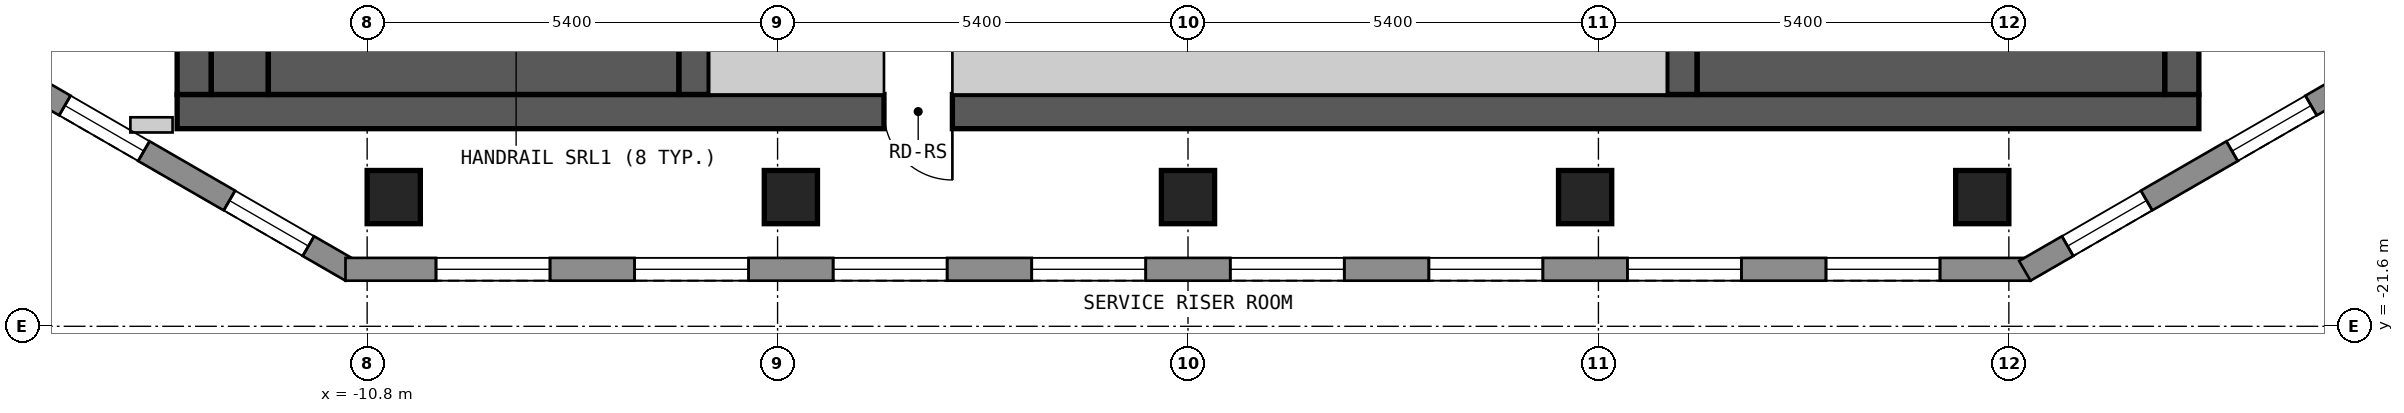
"""IFC4 building model, lengths in metres.
Left out: names, types, materials, properties, quantities, classifications, styles, units other than length and angle.
Written with IfcOpenShell. Run it as: python <this file> out.ifc"""

import sys

from ifc_helpers import new_model, si_unit, direction, frame, frame_2d, origin, origin_2d, place, context, subcontext, project, spatial, polyline, rectangle, outline, extrude, element, fill, save


model = new_model("IFC4")
c1 = context("Model", 3, precision=1e-05, world=origin(), true_north=direction((0.0, 1.0)))
c2 = subcontext(c1, "Body", "Model", "MODEL_VIEW")
j1 = project(units=[si_unit("LENGTHUNIT", "METRE"), si_unit("PLANEANGLEUNIT", "RADIAN")], contexts=[c1])
p1 = place(None, origin())
s1 = spatial("IfcSite", under=j1, at=p1, CompositionType="ELEMENT")
p2 = place(p1, origin())
s2 = spatial("IfcBuilding", under=s1, at=p2, CompositionType="ELEMENT")
p3 = place(p2, frame((0.0, 0.0, 220.8)))
s3 = spatial("IfcBuildingStorey", under=s2, at=p3, CompositionType="ELEMENT", Elevation=220.8)
for number, where, z_axis, x_axis in (
    (1, (-10.45, -19.9, 0.0), (0.0, 0.0, 1.0), (1.0, 0.0, 0.0)),
    (2, (-5.225, -19.9, 0.0), (0.0, 0.0, 1.0), (1.0, 0.0, 0.0)),
    (3, (0.0, -19.9, 0.0), (0.0, 0.0, 1.0), (1.0, 0.0, 0.0)),
    (4, (5.225, -19.9, 0.0), (0.0, 0.0, 1.0), (1.0, 0.0, 0.0)),
    (5, (10.45, -19.9, 0.0), (0.0, 0.0, 1.0), (1.0, 0.0, 0.0)),
):
    element("IfcColumn", number, at=place(p3, frame(where, z_axis=z_axis, x_axis=x_axis)), inside=s3, PredefinedType="COLUMN", context=c2, shape_type="SweptSolid", body=[
        extrude(rectangle(XDim=0.7, YDim=0.7, at=origin_2d()), origin(), (0.0, 0.0, 1.0), 3.0),
    ])
p4 = place(p3, frame((-13.3, -18.775, 0.0), z_axis=(0.0, 0.0, 1.0), x_axis=(1.0, 0.0, 0.0)))
e6 = element("IfcWall", 6, at=p4, inside=s3, PredefinedType="SHEAR", context=c2, shape_type="SweptSolid", body=[
    extrude(rectangle(XDim=26.6, YDim=0.45, at=frame_2d((13.3, 0.0))), origin(), (0.0, 0.0, 1.0), 2.7),
])
p5 = place(p4, frame((9.3, 0.0, 0.0)))
e7 = element("IfcOpeningElement", 7, at=p5, cuts=e6, PredefinedType="OPENING", context=c2, shape_type="SweptSolid", body=[
    extrude(rectangle(XDim=0.9, YDim=2.1, at=frame_2d((0.45, 1.05))), frame((0.0, 0.235, 0.0), z_axis=(0.0, -1.0, 0.0), x_axis=(1.0, 0.0, 0.0)), (0.0, 0.0, 1.0), 0.47),
])
p6 = place(p3, frame((-13.075, -18.55, 0.0), z_axis=(0.0, 0.0, 1.0), x_axis=(0.0, 1.0, 0.0)))
e8 = element("IfcWall", 8, at=p6, inside=s3, PredefinedType="SHEAR", context=c2, shape_type="SweptSolid", body=[
    extrude(rectangle(XDim=13.1, YDim=0.45, at=frame_2d((6.55, 0.0))), origin(), (0.0, 0.0, 1.0), 2.7),
])
p7 = place(p6, frame((4.35, 0.0, 0.0)))
e9 = element("IfcOpeningElement", 9, at=p7, cuts=e8, PredefinedType="OPENING", context=c2, shape_type="SweptSolid", body=[
    extrude(rectangle(XDim=1.2, YDim=2.1, at=frame_2d((0.6, 1.05))), frame((0.0, 0.235, 0.0), z_axis=(0.0, -1.0, 0.0), x_axis=(1.0, 0.0, 0.0)), (0.0, 0.0, 1.0), 0.47),
])
p8 = place(p3, frame((13.075, -18.55, 0.0), z_axis=(0.0, 0.0, 1.0), x_axis=(0.0, 1.0, 0.0)))
e10 = element("IfcWall", 10, at=p8, inside=s3, PredefinedType="SHEAR", context=c2, shape_type="SweptSolid", body=[
    extrude(rectangle(XDim=13.1, YDim=0.45, at=frame_2d((6.55, 0.0))), origin(), (0.0, 0.0, 1.0), 2.7),
])
for number, where, z_axis, x_axis in (
    (11, (-6.5, -18.55, 0.0), (0.0, 0.0, 1.0), (0.0, 1.0, 0.0)),
    (12, (6.5, -18.55, 0.0), (0.0, 0.0, 1.0), (0.0, 1.0, 0.0)),
):
    element("IfcWall", number, at=place(p3, frame(where, z_axis=z_axis, x_axis=x_axis)), inside=s3, PredefinedType="SHEAR", context=c2, shape_type="SweptSolid", body=[
        extrude(rectangle(XDim=3.7, YDim=0.4, at=frame_2d((1.85, 0.0))), origin(), (0.0, 0.0, 1.0), 2.7),
    ])
p9 = place(p3, frame((-15.34, -18.37, 0.0), z_axis=(0.0, 0.0, 1.0), x_axis=(0.866022959057, -0.500004234368, 0.0)))
e13 = element("IfcWall", 13, at=p9, inside=s3, PredefinedType="SOLIDWALL", context=c2, shape_type="SweptSolid", body=[
    extrude(outline(polyline([(0.0, -0.15), (5.0, -0.15), (4.92, 0.15), (0.08, 0.15), (0.0, -0.15)])), origin(), (0.0, 0.0, 1.0), 2.7),
])
p10 = place(p9, frame((0.65, 0.0, 0.15)))
e14 = element("IfcOpeningElement", 14, at=p10, cuts=e13, PredefinedType="OPENING", context=c2, shape_type="SweptSolid", body=[
    extrude(rectangle(XDim=1.2, YDim=2.1, at=frame_2d((0.6, 1.05))), frame((0.0, 0.16, 0.0), z_axis=(0.0, -1.0, 0.0), x_axis=(1.0, 0.0, 0.0)), (0.0, 0.0, 1.0), 0.32),
])
p11 = place(p9, frame((3.15, 0.0, 0.15)))
e15 = element("IfcOpeningElement", 15, at=p11, cuts=e13, PredefinedType="OPENING", context=c2, shape_type="SweptSolid", body=[
    extrude(rectangle(XDim=1.2, YDim=2.1, at=frame_2d((0.6, 1.05))), frame((0.0, 0.16, 0.0), z_axis=(0.0, -1.0, 0.0), x_axis=(1.0, 0.0, 0.0)), (0.0, 0.0, 1.0), 0.32),
])
p12 = place(p3, frame((-11.085, -20.85, 0.0), z_axis=(0.0, 0.0, 1.0), x_axis=(1.0, 0.0, 0.0)))
e16 = element("IfcWall", 16, at=p12, inside=s3, PredefinedType="SOLIDWALL", context=c2, shape_type="SweptSolid", body=[
    extrude(outline(polyline([(0.0, -0.15), (22.17, -0.15), (22.09, 0.15), (0.08, 0.15), (0.0, -0.15)])), origin(), (0.0, 0.0, 1.0), 2.7),
])
p13 = place(p12, frame((1.191, 0.0, 0.15)))
e17 = element("IfcOpeningElement", 17, at=p13, cuts=e16, PredefinedType="OPENING", context=c2, shape_type="SweptSolid", body=[
    extrude(rectangle(XDim=1.5, YDim=2.1, at=frame_2d((0.75, 1.05))), frame((0.0, 0.16, 0.0), z_axis=(0.0, -1.0, 0.0), x_axis=(1.0, 0.0, 0.0)), (0.0, 0.0, 1.0), 0.32),
])
p14 = place(p12, frame((3.804, 0.0, 0.15)))
e18 = element("IfcOpeningElement", 18, at=p14, cuts=e16, PredefinedType="OPENING", context=c2, shape_type="SweptSolid", body=[
    extrude(rectangle(XDim=1.5, YDim=2.1, at=frame_2d((0.75, 1.05))), frame((0.0, 0.16, 0.0), z_axis=(0.0, -1.0, 0.0), x_axis=(1.0, 0.0, 0.0)), (0.0, 0.0, 1.0), 0.32),
])
p15 = place(p12, frame((6.416, 0.0, 0.15)))
e19 = element("IfcOpeningElement", 19, at=p15, cuts=e16, PredefinedType="OPENING", context=c2, shape_type="SweptSolid", body=[
    extrude(rectangle(XDim=1.5, YDim=2.1, at=frame_2d((0.75, 1.05))), frame((0.0, 0.16, 0.0), z_axis=(0.0, -1.0, 0.0), x_axis=(1.0, 0.0, 0.0)), (0.0, 0.0, 1.0), 0.32),
])
p16 = place(p12, frame((9.029, 0.0, 0.15)))
e20 = element("IfcOpeningElement", 20, at=p16, cuts=e16, PredefinedType="OPENING", context=c2, shape_type="SweptSolid", body=[
    extrude(rectangle(XDim=1.5, YDim=2.1, at=frame_2d((0.75, 1.05))), frame((0.0, 0.16, 0.0), z_axis=(0.0, -1.0, 0.0), x_axis=(1.0, 0.0, 0.0)), (0.0, 0.0, 1.0), 0.32),
])
p17 = place(p12, frame((11.641, 0.0, 0.15)))
e21 = element("IfcOpeningElement", 21, at=p17, cuts=e16, PredefinedType="OPENING", context=c2, shape_type="SweptSolid", body=[
    extrude(rectangle(XDim=1.5, YDim=2.1, at=frame_2d((0.75, 1.05))), frame((0.0, 0.16, 0.0), z_axis=(0.0, -1.0, 0.0), x_axis=(1.0, 0.0, 0.0)), (0.0, 0.0, 1.0), 0.32),
])
p18 = place(p12, frame((14.254, 0.0, 0.15)))
e22 = element("IfcOpeningElement", 22, at=p18, cuts=e16, PredefinedType="OPENING", context=c2, shape_type="SweptSolid", body=[
    extrude(rectangle(XDim=1.5, YDim=2.1, at=frame_2d((0.75, 1.05))), frame((0.0, 0.16, 0.0), z_axis=(0.0, -1.0, 0.0), x_axis=(1.0, 0.0, 0.0)), (0.0, 0.0, 1.0), 0.32),
])
p19 = place(p12, frame((16.866, 0.0, 0.15)))
e23 = element("IfcOpeningElement", 23, at=p19, cuts=e16, PredefinedType="OPENING", context=c2, shape_type="SweptSolid", body=[
    extrude(rectangle(XDim=1.5, YDim=2.1, at=frame_2d((0.75, 1.05))), frame((0.0, 0.16, 0.0), z_axis=(0.0, -1.0, 0.0), x_axis=(1.0, 0.0, 0.0)), (0.0, 0.0, 1.0), 0.32),
])
p20 = place(p12, frame((19.479, 0.0, 0.15)))
e24 = element("IfcOpeningElement", 24, at=p20, cuts=e16, PredefinedType="OPENING", context=c2, shape_type="SweptSolid", body=[
    extrude(rectangle(XDim=1.5, YDim=2.1, at=frame_2d((0.75, 1.05))), frame((0.0, 0.16, 0.0), z_axis=(0.0, -1.0, 0.0), x_axis=(1.0, 0.0, 0.0)), (0.0, 0.0, 1.0), 0.32),
])
p21 = place(p3, frame((11.01, -20.87, 0.0), z_axis=(0.0, 0.0, 1.0), x_axis=(0.866022959057, 0.500004234368, 0.0)))
e25 = element("IfcWall", 25, at=p21, inside=s3, PredefinedType="SOLIDWALL", context=c2, shape_type="SweptSolid", body=[
    extrude(outline(polyline([(0.0, -0.15), (5.0, -0.15), (4.92, 0.15), (0.08, 0.15), (0.0, -0.15)])), origin(), (0.0, 0.0, 1.0), 2.7),
])
p22 = place(p21, frame((0.65, 0.0, 0.15)))
e26 = element("IfcOpeningElement", 26, at=p22, cuts=e25, PredefinedType="OPENING", context=c2, shape_type="SweptSolid", body=[
    extrude(rectangle(XDim=1.2, YDim=2.1, at=frame_2d((0.6, 1.05))), frame((0.0, 0.16, 0.0), z_axis=(0.0, -1.0, 0.0), x_axis=(1.0, 0.0, 0.0)), (0.0, 0.0, 1.0), 0.32),
])
p23 = place(p21, frame((3.149, 0.0, 0.15)))
e27 = element("IfcOpeningElement", 27, at=p23, cuts=e25, PredefinedType="OPENING", context=c2, shape_type="SweptSolid", body=[
    extrude(rectangle(XDim=1.2, YDim=2.1, at=frame_2d((0.6, 1.05))), frame((0.0, 0.16, 0.0), z_axis=(0.0, -1.0, 0.0), x_axis=(1.0, 0.0, 0.0)), (0.0, 0.0, 1.0), 0.32),
])
p24 = place(p3, frame((-13.915, -18.95, 0.0), z_axis=(0.0, 0.0, 1.0), x_axis=(1.0, 0.0, 0.0)))
e28 = element("IfcWall", 28, at=p24, inside=s3, PredefinedType="PARTITIONING", context=c2, shape_type="SweptSolid", body=[
    extrude(rectangle(XDim=0.555, YDim=0.2, at=frame_2d((0.277, 0.0))), origin(), (0.0, 0.0, 1.0), 2.7),
])
p25 = place(p3, frame((-12.475, -18.55, 0.0), z_axis=(0.0, 0.0, 1.0), x_axis=(0.0, 1.0, 0.0)))
e29 = element("IfcWall", 29, at=p25, inside=s3, PredefinedType="SOLIDWALL", context=c2, shape_type="SweptSolid", body=[
    extrude(rectangle(XDim=3.7, YDim=0.75, at=frame_2d((1.85, 0.0))), origin(), (0.0, 0.0, 1.0), 2.7),
])
p26 = place(p3, frame((-12.1, -18.175, 0.0), z_axis=(0.0, 0.0, 1.0), x_axis=(1.0, 0.0, 0.0)))
e30 = element("IfcWall", 30, at=p26, inside=s3, PredefinedType="SOLIDWALL", context=c2, shape_type="SweptSolid", body=[
    extrude(rectangle(XDim=5.4, YDim=0.75, at=frame_2d((2.7, 0.0))), origin(), (0.0, 0.0, 1.0), 2.7),
])
p27 = place(p3, frame((-6.3, -18.175, 0.0), z_axis=(0.0, 0.0, 1.0), x_axis=(1.0, 0.0, 0.0)))
e31 = element("IfcWall", 31, at=p27, inside=s3, PredefinedType="PARTITIONING", context=c2, shape_type="SweptSolid", body=[
    extrude(rectangle(XDim=2.3, YDim=0.75, at=frame_2d((1.15, 0.0))), origin(), (0.0, 0.0, 1.0), 2.7),
])
p28 = place(p3, frame((-3.1, -18.175, 0.0), z_axis=(0.0, 0.0, 1.0), x_axis=(1.0, 0.0, 0.0)))
e32 = element("IfcWall", 32, at=p28, inside=s3, PredefinedType="PARTITIONING", context=c2, shape_type="SweptSolid", body=[
    extrude(rectangle(XDim=9.4, YDim=0.75, at=frame_2d((4.7, 0.0))), origin(), (0.0, 0.0, 1.0), 2.7),
])
p29 = place(p3, frame((6.7, -18.075, 0.0), z_axis=(0.0, 0.0, 1.0), x_axis=(1.0, 0.0, 0.0)))
e33 = element("IfcWall", 33, at=p29, inside=s3, PredefinedType="SOLIDWALL", context=c2, shape_type="SweptSolid", body=[
    extrude(rectangle(XDim=6.15, YDim=0.95, at=frame_2d((3.075, 0.0))), origin(), (0.0, 0.0, 1.0), 2.7),
])
p30 = place(p10, origin())
e34 = element("IfcWindow", 34, at=p30, inside=s3, PartitioningType="SINGLE_PANEL", PredefinedType="WINDOW", context=c2, shape_type="SweptSolid", body=[
    extrude(rectangle(XDim=1.2, YDim=2.1, at=frame_2d((0.6, 1.05))), frame((0.0, 0.03, 0.0), z_axis=(0.0, -1.0, 0.0), x_axis=(1.0, 0.0, 0.0)), (0.0, 0.0, 1.0), 0.06),
])
fill(e14, e34)
p31 = place(p11, origin())
e35 = element("IfcWindow", 35, at=p31, inside=s3, PartitioningType="SINGLE_PANEL", PredefinedType="WINDOW", context=c2, shape_type="SweptSolid", body=[
    extrude(rectangle(XDim=1.2, YDim=2.1, at=frame_2d((0.6, 1.05))), frame((0.0, 0.03, 0.0), z_axis=(0.0, -1.0, 0.0), x_axis=(1.0, 0.0, 0.0)), (0.0, 0.0, 1.0), 0.06),
])
fill(e15, e35)
p32 = place(p13, origin())
e36 = element("IfcWindow", 36, at=p32, inside=s3, PartitioningType="SINGLE_PANEL", PredefinedType="WINDOW", context=c2, shape_type="SweptSolid", body=[
    extrude(rectangle(XDim=1.5, YDim=2.1, at=frame_2d((0.75, 1.05))), frame((0.0, 0.03, 0.0), z_axis=(0.0, -1.0, 0.0), x_axis=(1.0, 0.0, 0.0)), (0.0, 0.0, 1.0), 0.06),
])
fill(e17, e36)
p33 = place(p14, origin())
e37 = element("IfcWindow", 37, at=p33, inside=s3, PartitioningType="SINGLE_PANEL", PredefinedType="WINDOW", context=c2, shape_type="SweptSolid", body=[
    extrude(rectangle(XDim=1.5, YDim=2.1, at=frame_2d((0.75, 1.05))), frame((0.0, 0.03, 0.0), z_axis=(0.0, -1.0, 0.0), x_axis=(1.0, 0.0, 0.0)), (0.0, 0.0, 1.0), 0.06),
])
fill(e18, e37)
p34 = place(p15, origin())
e38 = element("IfcWindow", 38, at=p34, inside=s3, PartitioningType="SINGLE_PANEL", PredefinedType="WINDOW", context=c2, shape_type="SweptSolid", body=[
    extrude(rectangle(XDim=1.5, YDim=2.1, at=frame_2d((0.75, 1.05))), frame((0.0, 0.03, 0.0), z_axis=(0.0, -1.0, 0.0), x_axis=(1.0, 0.0, 0.0)), (0.0, 0.0, 1.0), 0.06),
])
fill(e19, e38)
p35 = place(p16, origin())
e39 = element("IfcWindow", 39, at=p35, inside=s3, PartitioningType="SINGLE_PANEL", PredefinedType="WINDOW", context=c2, shape_type="SweptSolid", body=[
    extrude(rectangle(XDim=1.5, YDim=2.1, at=frame_2d((0.75, 1.05))), frame((0.0, 0.03, 0.0), z_axis=(0.0, -1.0, 0.0), x_axis=(1.0, 0.0, 0.0)), (0.0, 0.0, 1.0), 0.06),
])
fill(e20, e39)
p36 = place(p17, origin())
e40 = element("IfcWindow", 40, at=p36, inside=s3, PartitioningType="SINGLE_PANEL", PredefinedType="WINDOW", context=c2, shape_type="SweptSolid", body=[
    extrude(rectangle(XDim=1.5, YDim=2.1, at=frame_2d((0.75, 1.05))), frame((0.0, 0.03, 0.0), z_axis=(0.0, -1.0, 0.0), x_axis=(1.0, 0.0, 0.0)), (0.0, 0.0, 1.0), 0.06),
])
fill(e21, e40)
p37 = place(p18, origin())
e41 = element("IfcWindow", 41, at=p37, inside=s3, PartitioningType="SINGLE_PANEL", PredefinedType="WINDOW", context=c2, shape_type="SweptSolid", body=[
    extrude(rectangle(XDim=1.5, YDim=2.1, at=frame_2d((0.75, 1.05))), frame((0.0, 0.03, 0.0), z_axis=(0.0, -1.0, 0.0), x_axis=(1.0, 0.0, 0.0)), (0.0, 0.0, 1.0), 0.06),
])
fill(e22, e41)
p38 = place(p19, origin())
e42 = element("IfcWindow", 42, at=p38, inside=s3, PartitioningType="SINGLE_PANEL", PredefinedType="WINDOW", context=c2, shape_type="SweptSolid", body=[
    extrude(rectangle(XDim=1.5, YDim=2.1, at=frame_2d((0.75, 1.05))), frame((0.0, 0.03, 0.0), z_axis=(0.0, -1.0, 0.0), x_axis=(1.0, 0.0, 0.0)), (0.0, 0.0, 1.0), 0.06),
])
fill(e23, e42)
p39 = place(p20, origin())
e43 = element("IfcWindow", 43, at=p39, inside=s3, PartitioningType="SINGLE_PANEL", PredefinedType="WINDOW", context=c2, shape_type="SweptSolid", body=[
    extrude(rectangle(XDim=1.5, YDim=2.1, at=frame_2d((0.75, 1.05))), frame((0.0, 0.03, 0.0), z_axis=(0.0, -1.0, 0.0), x_axis=(1.0, 0.0, 0.0)), (0.0, 0.0, 1.0), 0.06),
])
fill(e24, e43)
p40 = place(p22, origin())
e44 = element("IfcWindow", 44, at=p40, inside=s3, PartitioningType="SINGLE_PANEL", PredefinedType="WINDOW", context=c2, shape_type="SweptSolid", body=[
    extrude(rectangle(XDim=1.2, YDim=2.1, at=frame_2d((0.6, 1.05))), frame((0.0, 0.03, 0.0), z_axis=(0.0, -1.0, 0.0), x_axis=(1.0, 0.0, 0.0)), (0.0, 0.0, 1.0), 0.06),
])
fill(e26, e44)
p41 = place(p23, origin())
e45 = element("IfcWindow", 45, at=p41, inside=s3, PartitioningType="SINGLE_PANEL", PredefinedType="WINDOW", context=c2, shape_type="SweptSolid", body=[
    extrude(rectangle(XDim=1.2, YDim=2.1, at=frame_2d((0.6, 1.05))), frame((0.0, 0.03, 0.0), z_axis=(0.0, -1.0, 0.0), x_axis=(1.0, 0.0, 0.0)), (0.0, 0.0, 1.0), 0.06),
])
fill(e27, e45)
p42 = place(p5, origin())
e46 = element("IfcDoor", 46, at=p42, inside=s3, OperationType="SINGLE_SWING_RIGHT", PredefinedType="DOOR", context=c2, shape_type="SweptSolid", body=[
    extrude(rectangle(XDim=0.9, YDim=2.1, at=frame_2d((0.45, 1.05))), frame((0.0, 0.025, 0.0), z_axis=(0.0, -1.0, 0.0), x_axis=(1.0, 0.0, 0.0)), (0.0, 0.0, 1.0), 0.05),
])
fill(e7, e46)
save(model, sys.argv[1])
